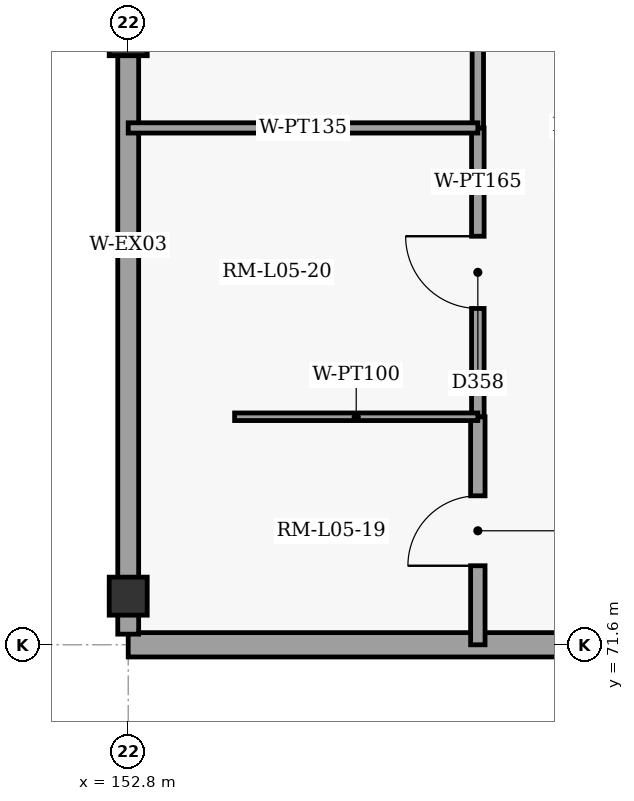
"""IFC4 building model, lengths in metres.
Left out: names, types, materials, properties, quantities, classifications, styles, units other than length and angle.
Written with IfcOpenShell. Run it as: python <this file> out.ifc"""

import sys

from ifc_helpers import new_model, si_unit, direction, frame, frame_2d, origin, origin_2d, place, context, subcontext, project, spatial, rectangle, extrude, element, fill, save


model = new_model("IFC4")
c1 = context("Model", 3, precision=1e-05, world=origin(), true_north=direction((0.0, 1.0)))
c2 = subcontext(c1, "Body", "Model", "MODEL_VIEW")
j1 = project(units=[si_unit("LENGTHUNIT", "METRE"), si_unit("PLANEANGLEUNIT", "RADIAN")], contexts=[c1])
p1 = place(None, origin())
s1 = spatial("IfcSite", under=j1, at=p1, CompositionType="ELEMENT")
p2 = place(p1, origin())
s2 = spatial("IfcBuilding", under=s1, at=p2, CompositionType="ELEMENT")
p3 = place(p2, frame((0.0, 0.0, 24.9)))
s3 = spatial("IfcBuildingStorey", under=s2, at=p3, CompositionType="ELEMENT", Elevation=24.9)
for number, where, z_axis, x_axis in (
    (1, (152.8, 72.24, 0.0), (0.0, 0.0, 1.0), (1.0, 0.0, 0.0)),
    (2, (152.8, 79.6, 0.0), (0.0, 0.0, 1.0), (1.0, 0.0, 0.0)),
):
    element("IfcColumn", number, at=place(p3, frame(where, z_axis=z_axis, x_axis=x_axis)), inside=s3, PredefinedType="COLUMN", context=c2, shape_type="SweptSolid", body=[
        extrude(rectangle(XDim=0.5, YDim=0.5, at=origin_2d()), origin(), (0.0, 0.0, 1.0), 4.5),
    ])
p4 = place(p3, frame((172.0, 71.6, 0.0), z_axis=(0.0, 0.0, 1.0), x_axis=(-1.0, 0.0, 0.0)))
e3 = element("IfcWall", 3, at=p4, inside=s3, PredefinedType="SOLIDWALL", context=c2, shape_type="SweptSolid", body=[
    extrude(rectangle(XDim=19.2, YDim=0.32, at=frame_2d((9.6, 0.0))), origin(), (0.0, 0.0, 1.0), 4.3),
])
p5 = place(p4, frame((10.0, 0.0, 0.8)))
e4 = element("IfcOpeningElement", 4, at=p5, cuts=e3, PredefinedType="OPENING", context=c2, shape_type="SweptSolid", body=[
    extrude(rectangle(XDim=2.45, YDim=2.8, at=frame_2d((1.225, 1.4))), frame((0.0, 0.17, 0.0), z_axis=(0.0, -1.0, 0.0), x_axis=(1.0, 0.0, 0.0)), (0.0, 0.0, 1.0), 0.34),
])
p6 = place(p3, frame((152.8, 71.74, 0.0), z_axis=(0.0, 0.0, 1.0), x_axis=(0.0, 1.0, 0.0)))
e5 = element("IfcWall", 5, at=p6, inside=s3, PredefinedType="SOLIDWALL", context=c2, shape_type="SweptSolid", body=[
    extrude(rectangle(XDim=46.12, YDim=0.275, at=frame_2d((23.06, 0.0))), origin(), (0.0, 0.0, 1.0), 3.45),
])
p7 = place(p3, frame((157.4, 71.6, 0.0), z_axis=(0.0, 0.0, 1.0), x_axis=(0.0, 1.0, 0.0)))
e6 = element("IfcWall", 6, at=p7, inside=s3, PredefinedType="PARTITIONING", context=c2, shape_type="SweptSolid", body=[
    extrude(rectangle(XDim=3.0, YDim=0.19, at=frame_2d((1.5, 0.0))), origin(), (0.0, 0.0, 1.0), 4.3),
])
p8 = place(p7, frame((1.04, 0.0, 0.0)))
e7 = element("IfcOpeningElement", 7, at=p8, cuts=e6, PredefinedType="OPENING", context=c2, shape_type="SweptSolid", body=[
    extrude(rectangle(XDim=0.92, YDim=2.1, at=frame_2d((0.46, 1.05))), frame((0.0, 0.105, 0.0), z_axis=(0.0, -1.0, 0.0), x_axis=(1.0, 0.0, 0.0)), (0.0, 0.0, 1.0), 0.21),
])
p9 = place(p3, frame((157.4, 74.6, 0.0), z_axis=(0.0, 0.0, 1.0), x_axis=(0.0, 1.0, 0.0)))
e8 = element("IfcWall", 8, at=p9, inside=s3, PredefinedType="PARTITIONING", context=c2, shape_type="SweptSolid", body=[
    extrude(rectangle(XDim=3.8, YDim=0.165, at=frame_2d((1.9, 0.0))), origin(), (0.0, 0.0, 1.0), 4.3),
])
p10 = place(p9, frame((1.425, 0.0, 0.0)))
e9 = element("IfcOpeningElement", 9, at=p10, cuts=e8, PredefinedType="OPENING", context=c2, shape_type="SweptSolid", body=[
    extrude(rectangle(XDim=0.95, YDim=2.1, at=frame_2d((0.475, 1.05))), frame((0.0, 0.093, 0.0), z_axis=(0.0, -1.0, 0.0), x_axis=(1.0, 0.0, 0.0)), (0.0, 0.0, 1.0), 0.185),
])
p11 = place(p3, frame((157.4, 78.4, 0.0), z_axis=(0.0, 0.0, 1.0), x_axis=(0.0, 1.0, 0.0)))
e10 = element("IfcWall", 10, at=p11, inside=s3, PredefinedType="PARTITIONING", context=c2, shape_type="SweptSolid", body=[
    extrude(rectangle(XDim=19.6, YDim=0.15, at=frame_2d((9.8, 0.0))), origin(), (0.0, 0.0, 1.0), 4.3),
])
p12 = place(p11, frame((9.29, 0.0, 0.0)))
e11 = element("IfcOpeningElement", 11, at=p12, cuts=e10, PredefinedType="OPENING", context=c2, shape_type="SweptSolid", body=[
    extrude(rectangle(XDim=1.02, YDim=2.1, at=frame_2d((0.51, 1.05))), frame((0.0, 0.085, 0.0), z_axis=(0.0, -1.0, 0.0), x_axis=(1.0, 0.0, 0.0)), (0.0, 0.0, 1.0), 0.17),
])
p13 = place(p3, frame((154.2, 74.6, 0.0), z_axis=(0.0, 0.0, 1.0), x_axis=(1.0, 0.0, 0.0)))
e12 = element("IfcWall", 12, at=p13, inside=s3, PredefinedType="PARTITIONING", context=c2, shape_type="SweptSolid", body=[
    extrude(rectangle(XDim=3.2, YDim=0.1, at=frame_2d((1.6, 0.0))), origin(), (0.0, 0.0, 1.0), 4.3),
])
p14 = place(p3, frame((152.8, 78.4, 0.0), z_axis=(0.0, 0.0, 1.0), x_axis=(1.0, 0.0, 0.0)))
e13 = element("IfcWall", 13, at=p14, inside=s3, PredefinedType="PARTITIONING", context=c2, shape_type="SweptSolid", body=[
    extrude(rectangle(XDim=4.6, YDim=0.135, at=frame_2d((2.3, 0.0))), origin(), (0.0, 0.0, 1.0), 4.3),
])
p15 = place(p8, origin())
e14 = element("IfcDoor", 14, at=p15, inside=s3, OperationType="SINGLE_SWING_LEFT", PredefinedType="DOOR", context=c2, shape_type="SweptSolid", body=[
    extrude(rectangle(XDim=0.92, YDim=2.1, at=frame_2d((0.46, 1.05))), frame((0.0, 0.025, 0.0), z_axis=(0.0, -1.0, 0.0), x_axis=(1.0, 0.0, 0.0)), (0.0, 0.0, 1.0), 0.05),
])
fill(e7, e14)
p16 = place(p10, origin())
e15 = element("IfcDoor", 15, at=p16, inside=s3, OperationType="SINGLE_SWING_RIGHT", PredefinedType="DOOR", context=c2, shape_type="SweptSolid", body=[
    extrude(rectangle(XDim=0.95, YDim=2.1, at=frame_2d((0.475, 1.05))), frame((0.0, 0.025, 0.0), z_axis=(0.0, -1.0, 0.0), x_axis=(1.0, 0.0, 0.0)), (0.0, 0.0, 1.0), 0.05),
])
fill(e9, e15)
save(model, sys.argv[1])
